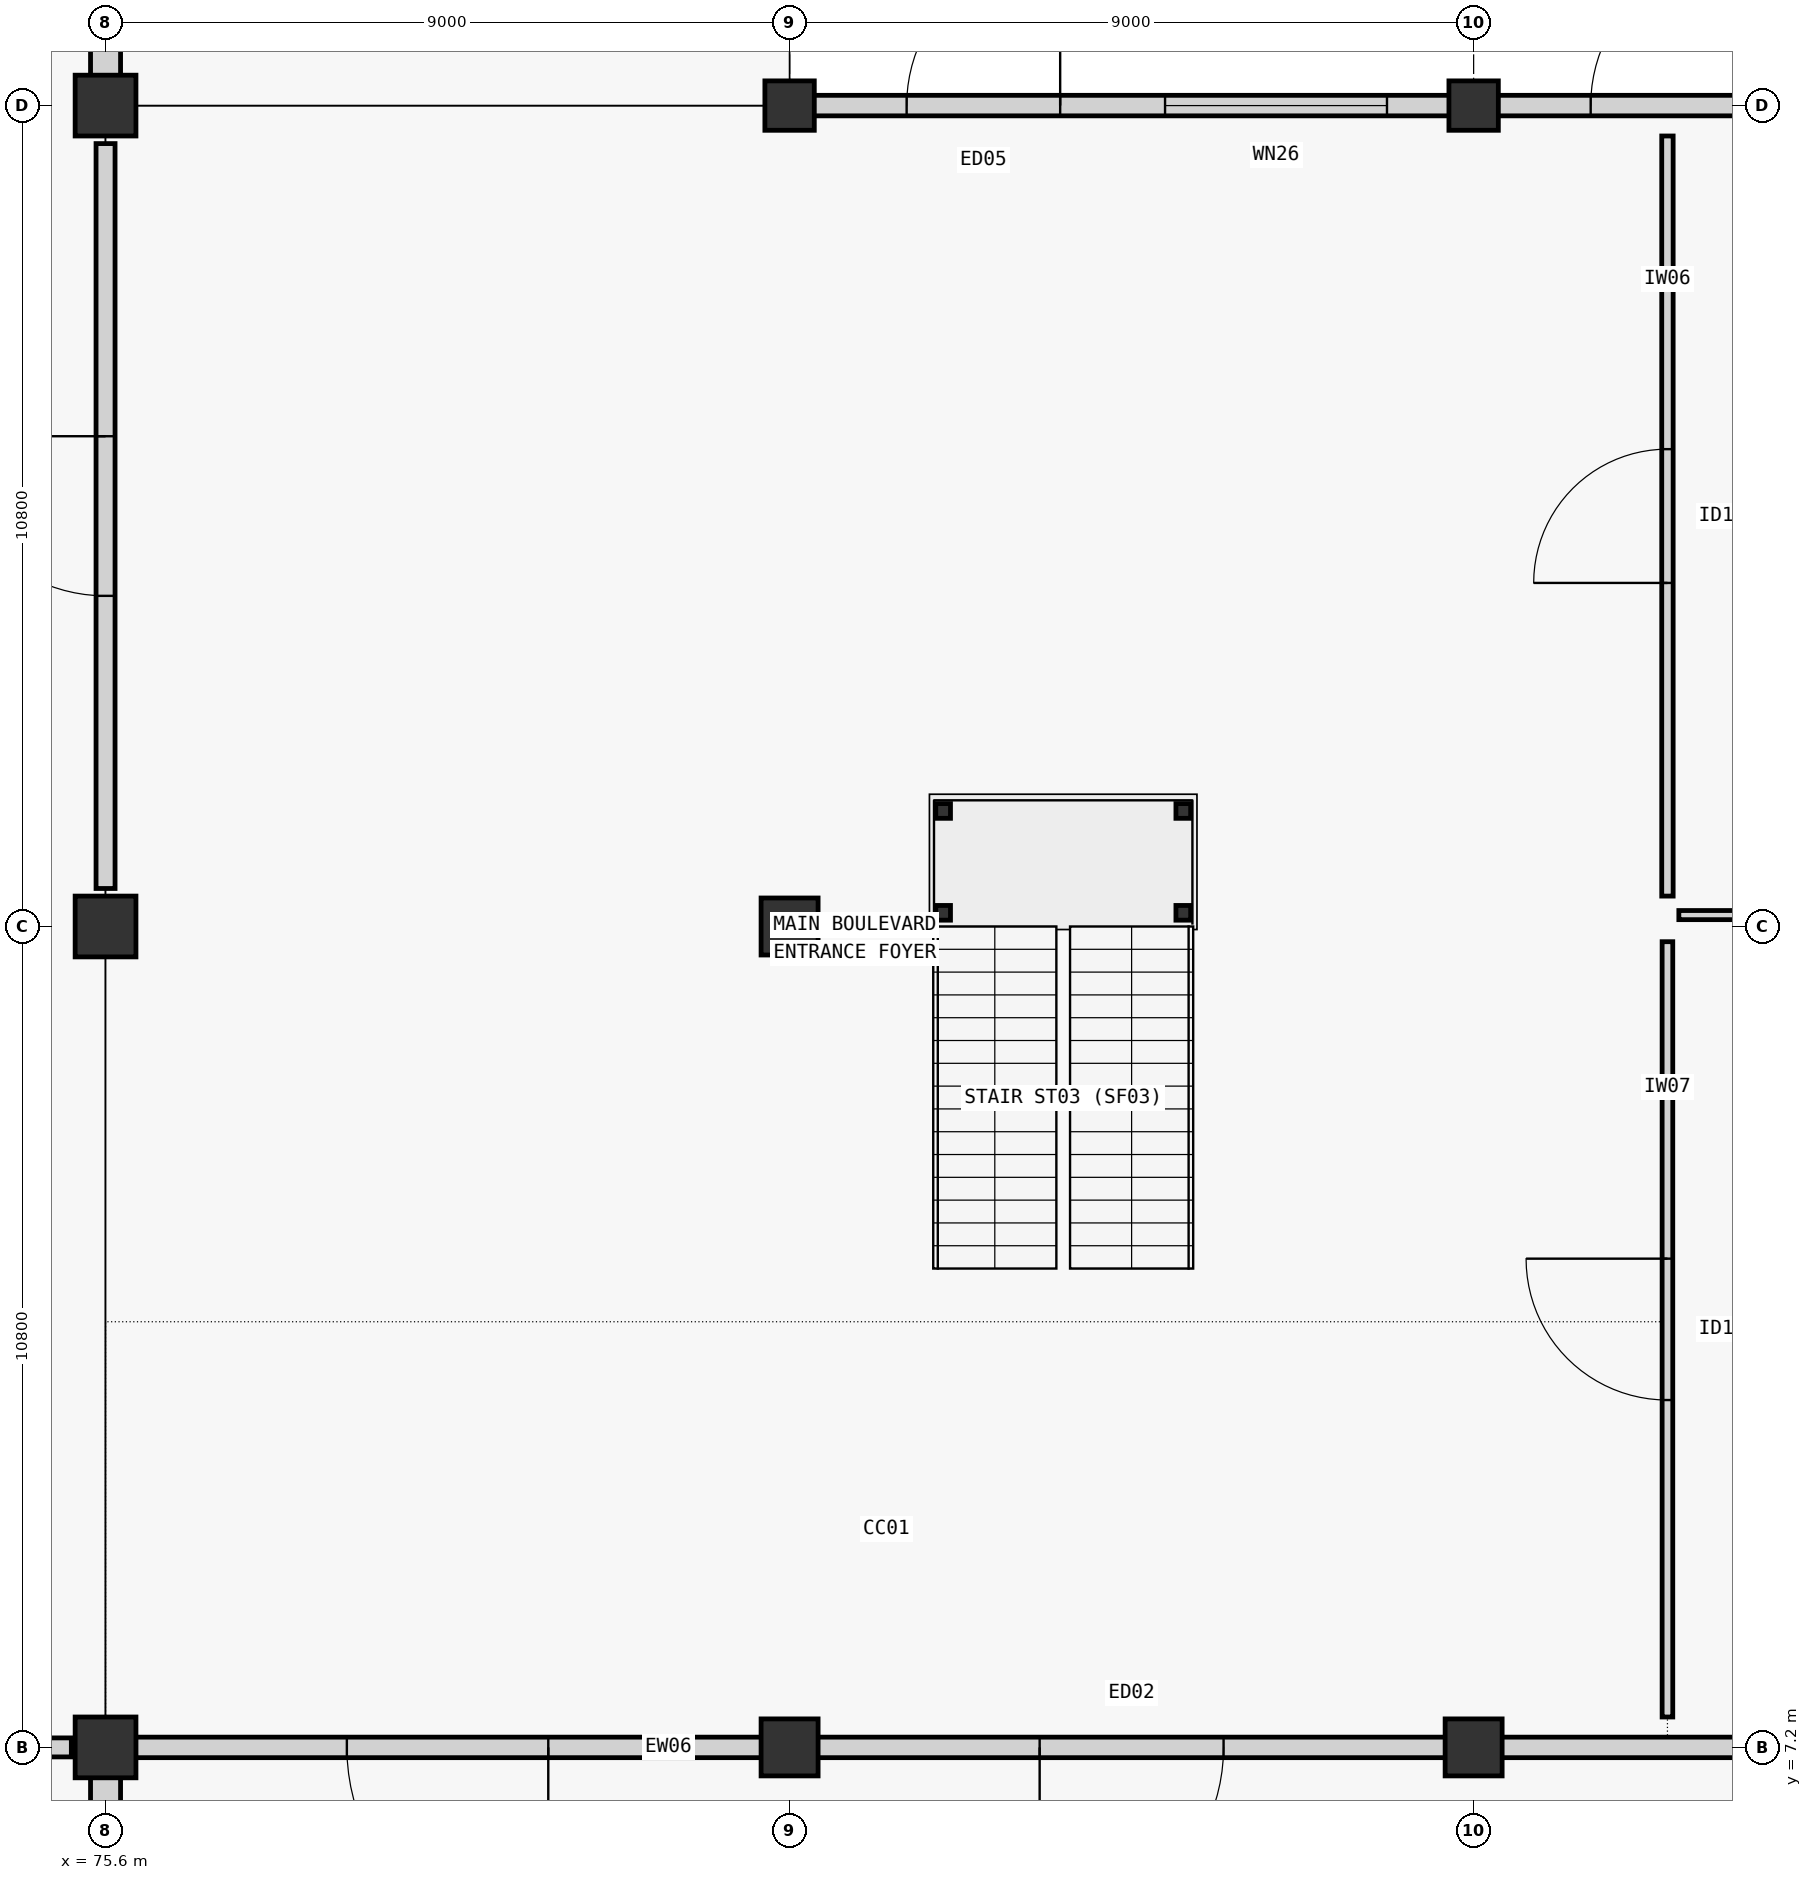
"""IFC4 building model, lengths in metres.
Left out: names, types, materials, properties, quantities, classifications, styles, units other than length and angle.
Written with IfcOpenShell. Run it as: python <this file> out.ifc"""

import sys

from ifc_helpers import new_model, si_unit, direction, frame, frame_2d, origin, origin_2d, place, context, subcontext, project, spatial, rectangle, circle, hollow_circle, extrude, element, fill, save


model = new_model("IFC4")
c1 = context("Model", 3, precision=1e-05, world=origin(), true_north=direction((0.0, 1.0)))
c2 = subcontext(c1, "Body", "Model", "MODEL_VIEW")
j1 = project(units=[si_unit("LENGTHUNIT", "METRE"), si_unit("PLANEANGLEUNIT", "RADIAN")], contexts=[c1])
p1 = place(None, origin())
s1 = spatial("IfcSite", under=j1, at=p1, CompositionType="ELEMENT")
p2 = place(p1, origin())
s2 = spatial("IfcBuilding", under=s1, at=p2, CompositionType="ELEMENT")
p3 = place(p2, origin())
s3 = spatial("IfcBuildingStorey", under=s2, at=p3, CompositionType="ELEMENT", Elevation=0.0)
for number, where, z_axis, x_axis in (
    (1, (75.6, 7.2, -0.3), (0.0, 0.0, 1.0), (1.0, 0.0, 0.0)),
    (2, (75.6, 18.0, -0.3), (0.0, 0.0, 1.0), (1.0, 0.0, 0.0)),
    (3, (75.6, 28.8, -0.3), (0.0, 0.0, 1.0), (1.0, 0.0, 0.0)),
):
    element("IfcColumn", number, at=place(p3, frame(where, z_axis=z_axis, x_axis=x_axis)), inside=s3, PredefinedType="COLUMN", context=c2, shape_type="SweptSolid", body=[
        extrude(rectangle(XDim=0.8, YDim=0.8, at=origin_2d()), origin(), (0.0, 0.0, 1.0), 5.7),
    ])
for number, where, z_axis, x_axis in (
    (4, (84.6, 7.2, -0.3), (0.0, 0.0, 1.0), (1.0, 0.0, 0.0)),
    (5, (84.6, 18.0, -0.3), (0.0, 0.0, 1.0), (1.0, 0.0, 0.0)),
):
    element("IfcColumn", number, at=place(p3, frame(where, z_axis=z_axis, x_axis=x_axis)), inside=s3, PredefinedType="COLUMN", context=c2, shape_type="SweptSolid", body=[
        extrude(circle(Radius=0.375, at=origin_2d()), origin(), (0.0, 0.0, 1.0), 5.7),
    ])
p4 = place(p3, frame((84.6, 28.8, -0.3), z_axis=(0.0, 0.0, 1.0), x_axis=(1.0, 0.0, 0.0)))
e6 = element("IfcColumn", 6, at=p4, inside=s3, PredefinedType="COLUMN", context=c2, shape_type="SweptSolid", body=[
    extrude(circle(Radius=0.325, at=origin_2d()), origin(), (0.0, 0.0, 1.0), 5.7),
])
p5 = place(p3, frame((93.6, 7.2, -0.3), z_axis=(0.0, 0.0, 1.0), x_axis=(1.0, 0.0, 0.0)))
e7 = element("IfcColumn", 7, at=p5, inside=s3, PredefinedType="COLUMN", context=c2, shape_type="SweptSolid", body=[
    extrude(circle(Radius=0.375, at=origin_2d()), origin(), (0.0, 0.0, 1.0), 5.7),
])
p6 = place(p3, frame((93.6, 28.8, -0.3), z_axis=(0.0, 0.0, 1.0), x_axis=(1.0, 0.0, 0.0)))
e8 = element("IfcColumn", 8, at=p6, inside=s3, PredefinedType="COLUMN", context=c2, shape_type="SweptSolid", body=[
    extrude(circle(Radius=0.325, at=origin_2d()), origin(), (0.0, 0.0, 1.0), 5.7),
])
p7 = place(p3, frame((75.6, 6.804, 0.0), z_axis=(0.0, 0.0, 1.0), x_axis=(0.0, -1.0, 0.0)))
e9 = element("IfcWall", 9, at=p7, inside=s3, PredefinedType="STANDARD", context=c2, shape_type="SweptSolid", body=[
    extrude(rectangle(XDim=6.408, YDim=0.395, at=frame_2d((3.204, 0.0))), origin(), (0.0, 0.0, 1.0), 4.495),
])
p8 = place(p3, frame((75.6, 39.204, 0.0), z_axis=(0.0, 0.0, 1.0), x_axis=(0.0, -1.0, 0.0)))
e10 = element("IfcWall", 10, at=p8, inside=s3, PredefinedType="STANDARD", context=c2, shape_type="SweptSolid", body=[
    extrude(rectangle(XDim=10.008, YDim=0.395, at=frame_2d((5.004, 0.0))), origin(), (0.0, 0.0, 1.0), 4.345),
])
p9 = place(p3, frame((84.238, 7.2, 0.0), z_axis=(0.0, 0.0, 1.0), x_axis=(-1.0, 0.0, 0.0)))
e11 = element("IfcWall", 11, at=p9, inside=s3, PredefinedType="STANDARD", context=c2, shape_type="SweptSolid", body=[
    extrude(rectangle(XDim=8.242, YDim=0.27, at=frame_2d((4.121, 0.0))), origin(), (0.0, 0.0, 1.0), 4.515),
])
p10 = place(p9, frame((2.813, 0.0, 0.0)))
e12 = element("IfcOpeningElement", 12, at=p10, cuts=e11, PredefinedType="OPENING", context=c2, shape_type="SweptSolid", body=[
    extrude(rectangle(XDim=2.65, YDim=2.85, at=frame_2d((1.325, 1.425))), frame((0.0, 0.135, 0.0), z_axis=(0.0, -1.0, 0.0), x_axis=(1.0, 0.0, 0.0)), (0.0, 0.0, 1.0), 0.27),
])
p11 = place(p3, frame((93.238, 7.2, 0.0), z_axis=(0.0, 0.0, 1.0), x_axis=(-1.0, 0.0, 0.0)))
e13 = element("IfcWall", 13, at=p11, inside=s3, PredefinedType="STANDARD", context=c2, shape_type="SweptSolid", body=[
    extrude(rectangle(XDim=8.276, YDim=0.27, at=frame_2d((4.138, 0.0))), origin(), (0.0, 0.0, 1.0), 4.515),
])
p12 = place(p11, frame((2.928, 0.0, 0.0)))
e14 = element("IfcOpeningElement", 14, at=p12, cuts=e13, PredefinedType="OPENING", context=c2, shape_type="SweptSolid", body=[
    extrude(rectangle(XDim=2.42, YDim=2.62, at=frame_2d((1.21, 1.31))), frame((0.0, 0.135, 0.0), z_axis=(0.0, -1.0, 0.0), x_axis=(1.0, 0.0, 0.0)), (0.0, 0.0, 1.0), 0.27),
])
p13 = place(p3, frame((84.911, 28.8, 0.0), z_axis=(0.0, 0.0, 1.0), x_axis=(1.0, 0.0, 0.0)))
e15 = element("IfcWall", 15, at=p13, inside=s3, PredefinedType="STANDARD", context=c2, shape_type="SweptSolid", body=[
    extrude(rectangle(XDim=8.379, YDim=0.27, at=frame_2d((4.189, 0.0))), origin(), (0.0, 0.0, 1.0), 4.515),
])
p14 = place(p13, frame((1.229, 0.0, 0.0)))
e16 = element("IfcOpeningElement", 16, at=p14, cuts=e15, PredefinedType="OPENING", context=c2, shape_type="SweptSolid", body=[
    extrude(rectangle(XDim=2.02, YDim=2.44, at=frame_2d((1.01, 1.22))), frame((0.0, 0.135, 0.0), z_axis=(0.0, -1.0, 0.0), x_axis=(1.0, 0.0, 0.0)), (0.0, 0.0, 1.0), 0.27),
])
p15 = place(p13, frame((4.629, 0.0, 0.9)))
e17 = element("IfcOpeningElement", 17, at=p15, cuts=e15, PredefinedType="OPENING", context=c2, shape_type="SweptSolid", body=[
    extrude(rectangle(XDim=2.92, YDim=2.52, at=frame_2d((1.46, 1.26))), frame((0.0, 0.135, 0.0), z_axis=(0.0, -1.0, 0.0), x_axis=(1.0, 0.0, 0.0)), (0.0, 0.0, 1.0), 0.27),
])
p16 = place(p3, frame((102.238, 7.2, 0.0), z_axis=(0.0, 0.0, 1.0), x_axis=(-1.0, 0.0, 0.0)))
e18 = element("IfcWall", 18, at=p16, inside=s3, PredefinedType="STANDARD", context=c2, shape_type="SweptSolid", body=[
    extrude(rectangle(XDim=8.276, YDim=0.27, at=frame_2d((4.138, 0.0))), origin(), (0.0, 0.0, 1.0), 4.515),
])
p17 = place(p16, frame((3.578, 0.0, 0.0)))
e19 = element("IfcOpeningElement", 19, at=p17, cuts=e18, PredefinedType="OPENING", context=c2, shape_type="SweptSolid", body=[
    extrude(rectangle(XDim=1.12, YDim=2.22, at=frame_2d((0.56, 1.11))), frame((0.0, 0.135, 0.0), z_axis=(0.0, -1.0, 0.0), x_axis=(1.0, 0.0, 0.0)), (0.0, 0.0, 1.0), 0.27),
])
p18 = place(p3, frame((93.911, 28.8, 0.0), z_axis=(0.0, 0.0, 1.0), x_axis=(1.0, 0.0, 0.0)))
e20 = element("IfcWall", 20, at=p18, inside=s3, PredefinedType="STANDARD", context=c2, shape_type="SweptSolid", body=[
    extrude(rectangle(XDim=8.379, YDim=0.27, at=frame_2d((4.189, 0.0))), origin(), (0.0, 0.0, 1.0), 4.515),
])
p19 = place(p18, frame((1.229, 0.0, 0.0)))
e21 = element("IfcOpeningElement", 21, at=p19, cuts=e20, PredefinedType="OPENING", context=c2, shape_type="SweptSolid", body=[
    extrude(rectangle(XDim=2.02, YDim=2.44, at=frame_2d((1.01, 1.22))), frame((0.0, 0.135, 0.0), z_axis=(0.0, -1.0, 0.0), x_axis=(1.0, 0.0, 0.0)), (0.0, 0.0, 1.0), 0.27),
])
p20 = place(p18, frame((4.329, 0.0, 0.9)))
e22 = element("IfcOpeningElement", 22, at=p20, cuts=e20, PredefinedType="OPENING", context=c2, shape_type="SweptSolid", body=[
    extrude(rectangle(XDim=3.22, YDim=2.62, at=frame_2d((1.61, 1.31))), frame((0.0, 0.135, 0.0), z_axis=(0.0, -1.0, 0.0), x_axis=(1.0, 0.0, 0.0)), (0.0, 0.0, 1.0), 0.27),
])
for number, where, z_axis, x_axis in (
    (23, (86.62, 18.18, -0.3), (0.0, 0.0, 1.0), (1.0, 0.0, 0.0)),
    (24, (89.78, 18.18, -0.3), (0.0, 0.0, 1.0), (1.0, 0.0, 0.0)),
    (25, (86.62, 19.52, -0.3), (0.0, 0.0, 1.0), (1.0, 0.0, 0.0)),
    (26, (89.78, 19.52, -0.3), (0.0, 0.0, 1.0), (1.0, 0.0, 0.0)),
):
    element("IfcColumn", number, at=place(p3, frame(where, z_axis=z_axis, x_axis=x_axis)), inside=s3, PredefinedType="COLUMN", context=c2, shape_type="SweptSolid", body=[
        extrude(hollow_circle(Radius=0.097, WallThickness=0.01, at=origin_2d()), origin(), (0.0, 0.0, 1.0), 2.782),
    ])
p21 = place(p3, frame((68.95, 7.2, 0.0), z_axis=(0.0, 0.0, 1.0), x_axis=(1.0, 0.0, 0.0)))
e27 = element("IfcWall", 27, at=p21, inside=s3, PredefinedType="STANDARD", context=c2, shape_type="SweptSolid", body=[
    extrude(rectangle(XDim=6.2, YDim=0.25, at=frame_2d((3.1, 0.0))), origin(), (0.0, 0.0, 1.0), 4.2),
])
p22 = place(p21, frame((3.162, 0.0, 0.0)))
e28 = element("IfcOpeningElement", 28, at=p22, cuts=e27, PredefinedType="OPENING", context=c2, shape_type="SweptSolid", body=[
    extrude(rectangle(XDim=1.1, YDim=2.18, at=frame_2d((0.55, 1.09))), frame((0.0, 0.125, 0.0), z_axis=(0.0, -1.0, 0.0), x_axis=(1.0, 0.0, 0.0)), (0.0, 0.0, 1.0), 0.25),
])
p23 = place(p3, frame((75.6, 18.5, 0.0), z_axis=(0.0, 0.0, 1.0), x_axis=(0.0, 1.0, 0.0)))
e29 = element("IfcWall", 29, at=p23, inside=s3, PredefinedType="STANDARD", context=c2, shape_type="SweptSolid", body=[
    extrude(rectangle(XDim=9.8, YDim=0.25, at=frame_2d((4.9, 0.0))), origin(), (0.0, 0.0, 1.0), 4.2),
])
p24 = place(p23, frame((3.85, 0.0, 0.0)))
e30 = element("IfcOpeningElement", 30, at=p24, cuts=e29, PredefinedType="OPENING", context=c2, shape_type="SweptSolid", body=[
    extrude(rectangle(XDim=2.1, YDim=2.4, at=frame_2d((1.05, 1.2))), frame((0.0, 0.125, 0.0), z_axis=(0.0, -1.0, 0.0), x_axis=(1.0, 0.0, 0.0)), (0.0, 0.0, 1.0), 0.25),
])
p25 = place(p3, frame((96.15, 18.4, 0.0), z_axis=(0.0, 0.0, 1.0), x_axis=(0.0, 1.0, 0.0)))
e31 = element("IfcWall", 31, at=p25, inside=s3, PredefinedType="STANDARD", context=c2, shape_type="SweptSolid", body=[
    extrude(rectangle(XDim=10.0, YDim=0.15, at=frame_2d((5.0, 0.0))), origin(), (0.0, 0.0, 1.0), 4.2),
])
p26 = place(p25, frame((4.12, 0.0, 0.0)))
e32 = element("IfcOpeningElement", 32, at=p26, cuts=e31, PredefinedType="OPENING", context=c2, shape_type="SweptSolid", body=[
    extrude(rectangle(XDim=1.76, YDim=2.3, at=frame_2d((0.88, 1.15))), frame((0.0, 0.075, 0.0), z_axis=(0.0, -1.0, 0.0), x_axis=(1.0, 0.0, 0.0)), (0.0, 0.0, 1.0), 0.15),
])
p27 = place(p3, frame((96.15, 7.6, 0.0), z_axis=(0.0, 0.0, 1.0), x_axis=(0.0, 1.0, 0.0)))
e33 = element("IfcWall", 33, at=p27, inside=s3, PredefinedType="STANDARD", context=c2, shape_type="SweptSolid", body=[
    extrude(rectangle(XDim=10.2, YDim=0.14, at=frame_2d((5.1, 0.0))), origin(), (0.0, 0.0, 1.0), 4.2),
])
p28 = place(p27, frame((4.17, 0.0, 0.0)))
e34 = element("IfcOpeningElement", 34, at=p28, cuts=e33, PredefinedType="OPENING", context=c2, shape_type="SweptSolid", body=[
    extrude(rectangle(XDim=1.86, YDim=2.32, at=frame_2d((0.93, 1.16))), frame((0.0, 0.07, 0.0), z_axis=(0.0, -1.0, 0.0), x_axis=(1.0, 0.0, 0.0)), (0.0, 0.0, 1.0), 0.14),
])
p29 = place(p3, frame((96.3, 18.15, 0.0), z_axis=(0.0, 0.0, 1.0), x_axis=(1.0, 0.0, 0.0)))
e35 = element("IfcWall", 35, at=p29, inside=s3, PredefinedType="STANDARD", context=c2, shape_type="SweptSolid", body=[
    extrude(rectangle(XDim=14.9, YDim=0.12, at=frame_2d((7.45, 0.0))), origin(), (0.0, 0.0, 1.0), 2.197),
])
p30 = place(p29, frame((6.99, 0.0, 0.0)))
e36 = element("IfcOpeningElement", 36, at=p30, cuts=e35, PredefinedType="OPENING", context=c2, shape_type="SweptSolid", body=[
    extrude(rectangle(XDim=0.92, YDim=2.12, at=frame_2d((0.46, 1.06))), frame((0.0, 0.06, 0.0), z_axis=(0.0, -1.0, 0.0), x_axis=(1.0, 0.0, 0.0)), (0.0, 0.0, 1.0), 0.12),
])
p31 = place(p10, origin())
e37 = element("IfcDoor", 37, at=p31, inside=s3, OperationType="SINGLE_SWING_LEFT", PredefinedType="DOOR", context=c2, shape_type="SweptSolid", body=[
    extrude(rectangle(XDim=2.65, YDim=2.85, at=frame_2d((1.325, 1.425))), frame((0.0, 0.025, 0.0), z_axis=(0.0, -1.0, 0.0), x_axis=(1.0, 0.0, 0.0)), (0.0, 0.0, 1.0), 0.05),
])
fill(e12, e37)
p32 = place(p12, origin())
e38 = element("IfcDoor", 38, at=p32, inside=s3, OperationType="SINGLE_SWING_RIGHT", PredefinedType="DOOR", context=c2, shape_type="SweptSolid", body=[
    extrude(rectangle(XDim=2.42, YDim=2.62, at=frame_2d((1.21, 1.31))), frame((0.0, 0.025, 0.0), z_axis=(0.0, -1.0, 0.0), x_axis=(1.0, 0.0, 0.0)), (0.0, 0.0, 1.0), 0.05),
])
fill(e14, e38)
p33 = place(p14, origin())
e39 = element("IfcDoor", 39, at=p33, inside=s3, OperationType="SINGLE_SWING_RIGHT", PredefinedType="DOOR", context=c2, shape_type="SweptSolid", body=[
    extrude(rectangle(XDim=2.02, YDim=2.44, at=frame_2d((1.01, 1.22))), frame((0.0, 0.025, 0.0), z_axis=(0.0, -1.0, 0.0), x_axis=(1.0, 0.0, 0.0)), (0.0, 0.0, 1.0), 0.05),
])
fill(e16, e39)
p34 = place(p15, origin())
e40 = element("IfcWindow", 40, at=p34, inside=s3, PartitioningType="SINGLE_PANEL", PredefinedType="WINDOW", context=c2, shape_type="SweptSolid", body=[
    extrude(rectangle(XDim=2.92, YDim=2.52, at=frame_2d((1.46, 1.26))), frame((0.0, 0.03, 0.0), z_axis=(0.0, -1.0, 0.0), x_axis=(1.0, 0.0, 0.0)), (0.0, 0.0, 1.0), 0.06),
])
fill(e17, e40)
p35 = place(p19, origin())
e41 = element("IfcDoor", 41, at=p35, inside=s3, OperationType="SINGLE_SWING_RIGHT", PredefinedType="DOOR", context=c2, shape_type="SweptSolid", body=[
    extrude(rectangle(XDim=2.02, YDim=2.44, at=frame_2d((1.01, 1.22))), frame((0.0, 0.025, 0.0), z_axis=(0.0, -1.0, 0.0), x_axis=(1.0, 0.0, 0.0)), (0.0, 0.0, 1.0), 0.05),
])
fill(e21, e41)
p36 = place(p24, origin())
e42 = element("IfcDoor", 42, at=p36, inside=s3, OperationType="SINGLE_SWING_RIGHT", PredefinedType="DOOR", context=c2, shape_type="SweptSolid", body=[
    extrude(rectangle(XDim=2.1, YDim=2.4, at=frame_2d((1.05, 1.2))), frame((0.0, 0.025, 0.0), z_axis=(0.0, -1.0, 0.0), x_axis=(1.0, 0.0, 0.0)), (0.0, 0.0, 1.0), 0.05),
])
fill(e30, e42)
p37 = place(p26, origin())
e43 = element("IfcDoor", 43, at=p37, inside=s3, OperationType="SINGLE_SWING_LEFT", PredefinedType="DOOR", context=c2, shape_type="SweptSolid", body=[
    extrude(rectangle(XDim=1.76, YDim=2.3, at=frame_2d((0.88, 1.15))), frame((0.0, 0.025, 0.0), z_axis=(0.0, -1.0, 0.0), x_axis=(1.0, 0.0, 0.0)), (0.0, 0.0, 1.0), 0.05),
])
fill(e32, e43)
p38 = place(p28, origin())
e44 = element("IfcDoor", 44, at=p38, inside=s3, OperationType="SINGLE_SWING_RIGHT", PredefinedType="DOOR", context=c2, shape_type="SweptSolid", body=[
    extrude(rectangle(XDim=1.86, YDim=2.32, at=frame_2d((0.93, 1.16))), frame((0.0, 0.025, 0.0), z_axis=(0.0, -1.0, 0.0), x_axis=(1.0, 0.0, 0.0)), (0.0, 0.0, 1.0), 0.05),
])
fill(e34, e44)
save(model, sys.argv[1])
